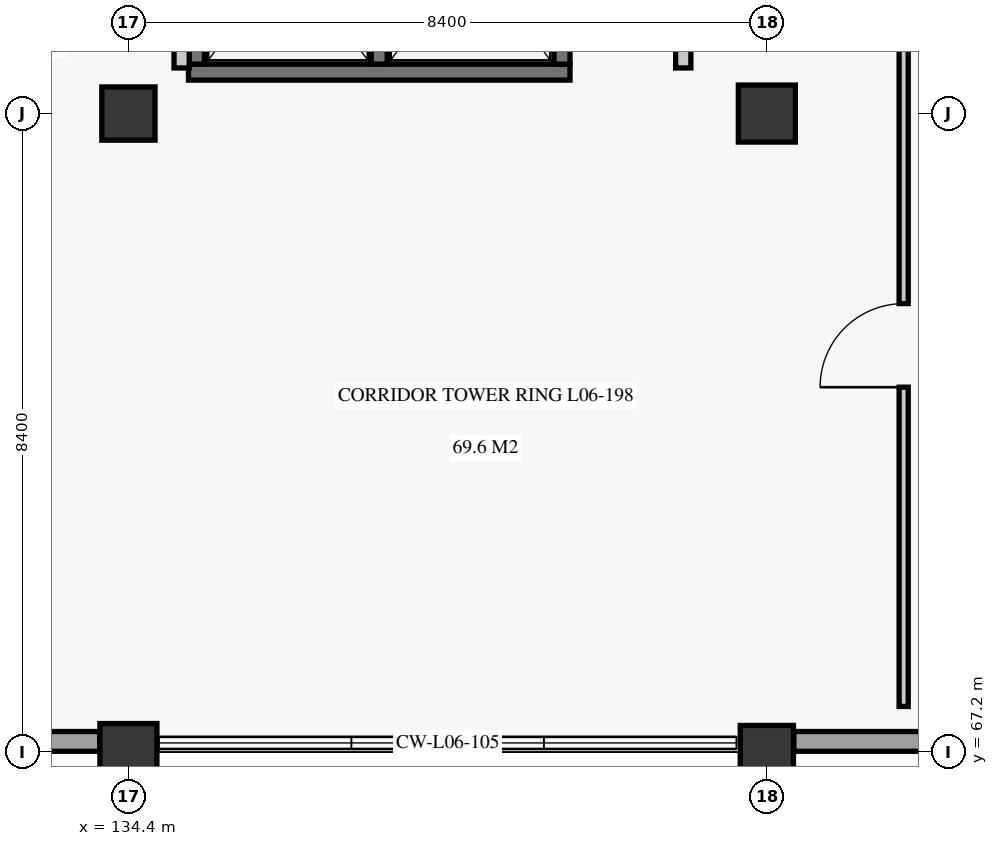
"""IFC4 building model, lengths in metres.
Left out: names, types, materials, properties, quantities, classifications, styles, units other than length and angle.
Written with IfcOpenShell. Run it as: python <this file> out.ifc"""

import sys

from ifc_helpers import new_model, si_unit, direction, frame, frame_2d, origin, origin_2d, place, context, subcontext, project, spatial, rectangle, extrude, element, fill, save


model = new_model("IFC4")
c1 = context("Model", 3, precision=1e-05, world=origin(), true_north=direction((0.0, 1.0)))
c2 = subcontext(c1, "Body", "Model", "MODEL_VIEW")
j1 = project(units=[si_unit("LENGTHUNIT", "METRE"), si_unit("PLANEANGLEUNIT", "RADIAN")], contexts=[c1])
p1 = place(None, origin())
s1 = spatial("IfcSite", under=j1, at=p1, CompositionType="ELEMENT")
p2 = place(p1, origin())
s2 = spatial("IfcBuilding", under=s1, at=p2, CompositionType="ELEMENT")
p3 = place(p2, frame((0.0, 0.0, 26.7)))
s3 = spatial("IfcBuildingStorey", under=s2, at=p3, CompositionType="ELEMENT", Elevation=26.7)
p4 = place(p3, frame((134.4, 67.2, 0.0), z_axis=(0.0, 0.0, 1.0), x_axis=(1.0, 0.0, 0.0)))
e1 = element("IfcColumn", 1, at=p4, inside=s3, PredefinedType="COLUMN", context=c2, shape_type="SweptSolid", body=[
    extrude(rectangle(XDim=0.75, YDim=0.75, at=origin_2d()), origin(), (0.0, 0.0, 1.0), 3.72),
])
for number, where, z_axis, x_axis in (
    (2, (134.4, 75.6, 0.0), (0.0, 0.0, 1.0), (1.0, 0.0, 0.0)),
    (3, (142.8, 67.2, 0.0), (0.0, 0.0, 1.0), (1.0, 0.0, 0.0)),
):
    element("IfcColumn", number, at=place(p3, frame(where, z_axis=z_axis, x_axis=x_axis)), inside=s3, PredefinedType="COLUMN", context=c2, shape_type="SweptSolid", body=[
        extrude(rectangle(XDim=0.7, YDim=0.7, at=origin_2d()), origin(), (0.0, 0.0, 1.0), 3.72),
    ])
p5 = place(p3, frame((142.8, 75.6, 0.0), z_axis=(0.0, 0.0, 1.0), x_axis=(1.0, 0.0, 0.0)))
e4 = element("IfcColumn", 4, at=p5, inside=s3, PredefinedType="COLUMN", context=c2, shape_type="SweptSolid", body=[
    extrude(rectangle(XDim=0.75, YDim=0.75, at=origin_2d()), origin(), (0.0, 0.0, 1.0), 3.72),
])
p6 = place(p3, frame((126.352, 67.34, 0.0), z_axis=(0.0, 0.0, 1.0), x_axis=(1.0, 0.0, 0.0)))
e5 = element("IfcWall", 5, at=p6, inside=s3, PredefinedType="SOLIDWALL", context=c2, shape_type="SweptSolid", body=[
    extrude(rectangle(XDim=7.67, YDim=0.26, at=frame_2d((3.835, 0.0))), origin(), (0.0, 0.0, 1.0), 3.04),
])
p7 = place(p6, frame((2.298, 0.0, 0.85)))
e6 = element("IfcOpeningElement", 6, at=p7, cuts=e5, PredefinedType="OPENING", context=c2, shape_type="SweptSolid", body=[
    extrude(rectangle(XDim=3.1, YDim=1.85, at=frame_2d((1.55, 0.925))), frame((0.0, 0.14, 0.0), z_axis=(0.0, -1.0, 0.0), x_axis=(1.0, 0.0, 0.0)), (0.0, 0.0, 1.0), 0.28),
])
p8 = place(p3, frame((143.154, 67.34, 0.0), z_axis=(0.0, 0.0, 1.0), x_axis=(1.0, 0.0, 0.0)))
e7 = element("IfcWall", 7, at=p8, inside=s3, PredefinedType="SOLIDWALL", context=c2, shape_type="SweptSolid", body=[
    extrude(rectangle(XDim=7.668, YDim=0.26, at=frame_2d((3.834, 0.0))), origin(), (0.0, 0.0, 1.0), 3.04),
])
p9 = place(p8, frame((3.146, 0.0, 0.85)))
e8 = element("IfcOpeningElement", 8, at=p9, cuts=e7, PredefinedType="OPENING", context=c2, shape_type="SweptSolid", body=[
    extrude(rectangle(XDim=1.4, YDim=1.7, at=frame_2d((0.7, 0.85))), frame((0.0, 0.14, 0.0), z_axis=(0.0, -1.0, 0.0), x_axis=(1.0, 0.0, 0.0)), (0.0, 0.0, 1.0), 0.28),
])
p10 = place(p3, frame((135.19, 76.145, 0.0), z_axis=(0.0, 0.0, 1.0), x_axis=(1.0, 0.0, 0.0)))
e9 = element("IfcWall", 9, at=p10, inside=s3, PredefinedType="SHEAR", context=c2, shape_type="SweptSolid", body=[
    extrude(rectangle(XDim=5.02, YDim=0.21, at=frame_2d((2.51, 0.0))), origin(), (0.0, 0.0, 1.0), 3.72),
])
for number, where, z_axis, x_axis in (
    (10, (135.295, 76.25, 0.0), (0.0, 0.0, 1.0), (0.0, 1.0, 0.0)),
    (11, (140.105, 76.25, 0.0), (0.0, 0.0, 1.0), (0.0, 1.0, 0.0)),
    (12, (137.7, 76.25, 0.0), (0.0, 0.0, 1.0), (0.0, 1.0, 0.0)),
):
    element("IfcWall", number, at=place(p3, frame(where, z_axis=z_axis, x_axis=x_axis)), inside=s3, PredefinedType="SHEAR", context=c2, shape_type="SweptSolid", body=[
        extrude(rectangle(XDim=3.0, YDim=0.21, at=frame_2d((1.5, 0.0))), origin(), (0.0, 0.0, 1.0), 3.72),
    ])
for number, where, z_axis, x_axis in (
    (13, (135.1, 76.2, 0.0), (0.0, 0.0, 1.0), (0.0, 1.0, 0.0)),
    (14, (141.7, 76.2, 0.0), (0.0, 0.0, 1.0), (0.0, 1.0, 0.0)),
):
    element("IfcWall", number, at=place(p3, frame(where, z_axis=z_axis, x_axis=x_axis)), inside=s3, PredefinedType="PARTITIONING", context=c2, shape_type="SweptSolid", body=[
        extrude(rectangle(XDim=7.25, YDim=0.2, at=frame_2d((3.625, 0.0))), origin(), (0.0, 0.0, 1.0), 3.34),
    ])
p11 = place(p3, frame((144.6, 67.8, 0.0), z_axis=(0.0, 0.0, 1.0), x_axis=(0.0, 1.0, 0.0)))
e15 = element("IfcWall", 15, at=p11, inside=s3, PredefinedType="PARTITIONING", context=c2, shape_type="SweptSolid", body=[
    extrude(rectangle(XDim=32.4, YDim=0.12, at=frame_2d((16.2, 0.0))), origin(), (0.0, 0.0, 1.0), 3.34),
])
p12 = place(p11, frame((4.2, 0.0, 0.0)))
e16 = element("IfcOpeningElement", 16, at=p12, cuts=e15, PredefinedType="OPENING", context=c2, shape_type="SweptSolid", body=[
    extrude(rectangle(XDim=1.1, YDim=2.15, at=frame_2d((0.55, 1.075))), frame((0.0, 0.07, 0.0), z_axis=(0.0, -1.0, 0.0), x_axis=(1.0, 0.0, 0.0)), (0.0, 0.0, 1.0), 0.14),
])
p13 = place(p11, frame((18.0, 0.0, 0.0)))
e17 = element("IfcOpeningElement", 17, at=p13, cuts=e15, PredefinedType="OPENING", context=c2, shape_type="SweptSolid", body=[
    extrude(rectangle(XDim=1.1, YDim=2.15, at=frame_2d((0.55, 1.075))), frame((0.0, 0.07, 0.0), z_axis=(0.0, -1.0, 0.0), x_axis=(1.0, 0.0, 0.0)), (0.0, 0.0, 1.0), 0.14),
])
p14 = place(p12, origin())
e18 = element("IfcDoor", 18, at=p14, inside=s3, OperationType="SINGLE_SWING_LEFT", PredefinedType="DOOR", context=c2, shape_type="SweptSolid", body=[
    extrude(rectangle(XDim=1.1, YDim=2.15, at=frame_2d((0.55, 1.075))), frame((0.0, 0.025, 0.0), z_axis=(0.0, -1.0, 0.0), x_axis=(1.0, 0.0, 0.0)), (0.0, 0.0, 1.0), 0.05),
])
fill(e16, e18)
save(model, sys.argv[1])
